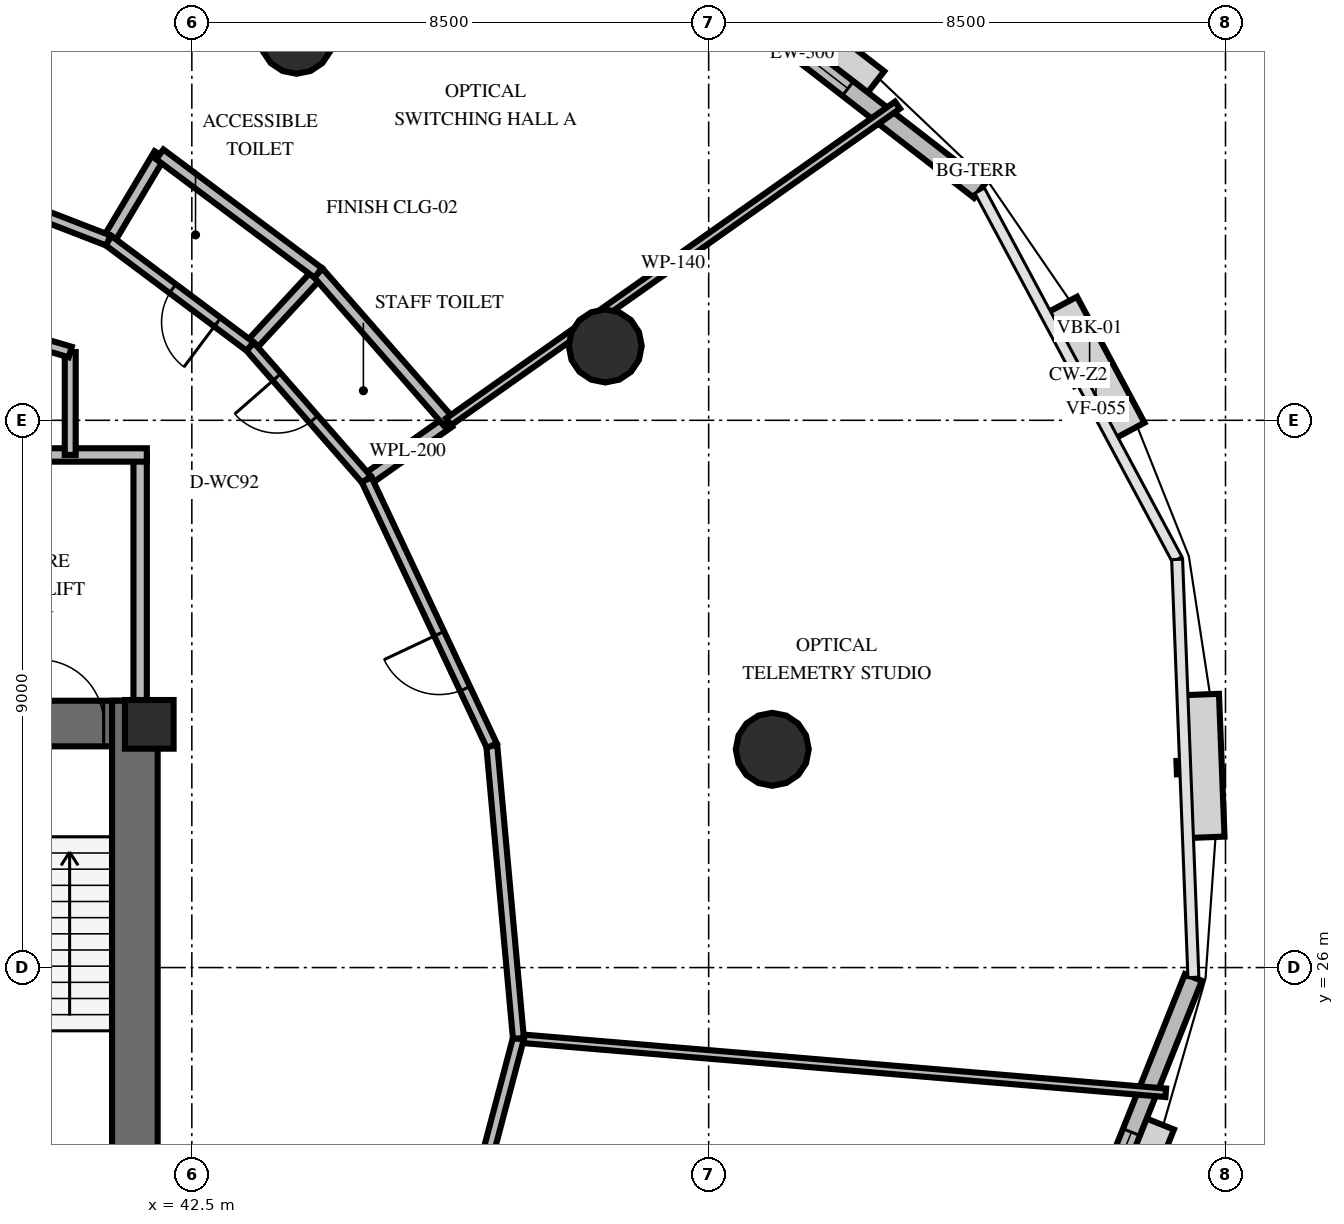
"""IFC4 building model, lengths in metres.
Left out: names, types, materials, properties, quantities, classifications, styles, units other than length and angle.
Written with IfcOpenShell. Run it as: python <this file> out.ifc"""

import sys

from ifc_helpers import new_model, si_unit, direction, frame, frame_2d, origin, origin_2d, place, context, subcontext, project, spatial, rectangle, circle, extrude, element, fill, save


model = new_model("IFC4")
c1 = context("Model", 3, precision=1e-05, world=origin(), true_north=direction((0.0, 1.0)))
c2 = subcontext(c1, "Body", "Model", "MODEL_VIEW")
j1 = project(units=[si_unit("LENGTHUNIT", "METRE"), si_unit("PLANEANGLEUNIT", "RADIAN")], contexts=[c1])
p1 = place(None, origin())
s1 = spatial("IfcSite", under=j1, at=p1, CompositionType="ELEMENT")
p2 = place(p1, origin())
s2 = spatial("IfcBuilding", under=s1, at=p2, CompositionType="ELEMENT")
p3 = place(p2, frame((0.0, 0.0, 97.8)))
s3 = spatial("IfcBuildingStorey", under=s2, at=p3, CompositionType="ELEMENT", Elevation=97.8)
p4 = place(p3, frame((26.072, 30.013, 0.0), z_axis=(0.0, 0.0, 1.0), x_axis=(1.0, 0.0, 0.0)))
e1 = element("IfcWall", 1, at=p4, inside=s3, PredefinedType="SHEAR", context=c2, shape_type="SweptSolid", body=[
    extrude(rectangle(XDim=15.866, YDim=0.75, at=frame_2d((7.933, 0.0))), origin(), (0.0, 0.0, 1.0), 4.0),
])
p5 = place(p4, frame((0.878, 0.0, 0.0)))
e2 = element("IfcOpeningElement", 2, at=p5, cuts=e1, PredefinedType="OPENING", context=c2, shape_type="SweptSolid", body=[
    extrude(rectangle(XDim=1.05, YDim=2.15, at=frame_2d((0.525, 1.075))), frame((0.0, 0.385, 0.0), z_axis=(0.0, -1.0, 0.0), x_axis=(1.0, 0.0, 0.0)), (0.0, 0.0, 1.0), 0.77),
])
p6 = place(p4, frame((13.928, 0.0, 0.0)))
e3 = element("IfcOpeningElement", 3, at=p6, cuts=e1, PredefinedType="OPENING", context=c2, shape_type="SweptSolid", body=[
    extrude(rectangle(XDim=1.05, YDim=2.15, at=frame_2d((0.525, 1.075))), frame((0.0, 0.385, 0.0), z_axis=(0.0, -1.0, 0.0), x_axis=(1.0, 0.0, 0.0)), (0.0, 0.0, 1.0), 0.77),
])
p7 = place(p4, frame((7.378, 0.0, 0.0)))
e4 = element("IfcOpeningElement", 4, at=p7, cuts=e1, PredefinedType="OPENING", context=c2, shape_type="SweptSolid", body=[
    extrude(rectangle(XDim=1.1, YDim=2.15, at=frame_2d((0.55, 1.075))), frame((0.0, 0.385, 0.0), z_axis=(0.0, -1.0, 0.0), x_axis=(1.0, 0.0, 0.0)), (0.0, 0.0, 1.0), 0.77),
])
p8 = place(p3, frame((41.563, 19.812, 0.0), z_axis=(0.0, 0.0, 1.0), x_axis=(0.0, 1.0, 0.0)))
e5 = element("IfcWall", 5, at=p8, inside=s3, PredefinedType="SHEAR", context=c2, shape_type="SweptSolid", body=[
    extrude(rectangle(XDim=10.576, YDim=0.75, at=frame_2d((5.288, 0.0))), origin(), (0.0, 0.0, 1.0), 4.0),
])
p9 = place(p3, frame((41.8, 30.0, 0.0), z_axis=(0.0, 0.0, 1.0), x_axis=(1.0, 0.0, 0.0)))
e6 = element("IfcColumn", 6, at=p9, inside=s3, PredefinedType="PILASTER", context=c2, shape_type="SweptSolid", body=[
    extrude(rectangle(XDim=0.8, YDim=0.8, at=origin_2d()), origin(), (0.0, 0.0, 1.0), 4.0),
])
for number, where, z_axis, x_axis in (
    (7, (52.046, 29.59, 0.0), (0.0, 0.0, 1.0), (1.0, 0.0, 0.0)),
    (8, (49.299, 36.222, 0.0), (0.0, 0.0, 1.0), (1.0, 0.0, 0.0)),
    (9, (44.222, 41.299, 0.0), (0.0, 0.0, 1.0), (1.0, 0.0, 0.0)),
):
    element("IfcColumn", number, at=place(p3, frame(where, z_axis=z_axis, x_axis=x_axis)), inside=s3, PredefinedType="COLUMN", context=c2, shape_type="SweptSolid", body=[
        extrude(circle(Radius=0.6, at=origin_2d()), origin(), (0.0, 0.0, 1.0), 4.0),
    ])
p10 = place(p3, frame((55.457, 38.776, 0.0), z_axis=(0.0, 0.0, 1.0), x_axis=(-0.79036781861, 0.61263260712, 0.0)))
e10 = element("IfcWall", 10, at=p10, inside=s3, PredefinedType="SOLIDWALL", context=c2, shape_type="SweptSolid", body=[
    extrude(rectangle(XDim=7.383, YDim=0.3, at=frame_2d((3.692, 0.0))), origin(), (0.0, 0.0, 1.0), 2.9),
])
p11 = place(p10, frame((2.742, 0.0, 0.8)))
e11 = element("IfcOpeningElement", 11, at=p11, cuts=e10, PredefinedType="OPENING", context=c2, shape_type="SweptSolid", body=[
    extrude(rectangle(XDim=1.9, YDim=1.95, at=frame_2d((0.95, 0.975))), frame((0.0, 0.16, 0.0), z_axis=(0.0, -1.0, 0.0), x_axis=(1.0, 0.0, 0.0)), (0.0, 0.0, 1.0), 0.32),
])
p12 = place(p3, frame((56.228, 18.984, 0.0), z_axis=(0.0, 0.0, 1.0), x_axis=(0.371704219928, 0.928351212035, 0.0)))
e12 = element("IfcWall", 12, at=p12, inside=s3, PredefinedType="SOLIDWALL", context=c2, shape_type="SweptSolid", body=[
    extrude(rectangle(XDim=7.383, YDim=0.3, at=frame_2d((3.692, 0.0))), origin(), (0.0, 0.0, 1.0), 2.9),
])
p13 = place(p12, frame((2.742, 0.0, 0.8)))
e13 = element("IfcOpeningElement", 13, at=p13, cuts=e12, PredefinedType="OPENING", context=c2, shape_type="SweptSolid", body=[
    extrude(rectangle(XDim=1.9, YDim=1.95, at=frame_2d((0.95, 0.975))), frame((0.0, 0.16, 0.0), z_axis=(0.0, -1.0, 0.0), x_axis=(1.0, 0.0, 0.0)), (0.0, 0.0, 1.0), 0.32),
])
p14 = place(p3, frame((41.65, 30.05, 0.0), z_axis=(0.0, 0.0, 1.0), x_axis=(0.0, 1.0, 0.0)))
e14 = element("IfcWall", 14, at=p14, inside=s3, PredefinedType="SOLIDWALL", context=c2, shape_type="SweptSolid", body=[
    extrude(rectangle(XDim=4.38, YDim=0.22, at=frame_2d((2.19, 0.0))), origin(), (0.0, 0.0, 1.0), 2.8),
])
p15 = place(p3, frame((37.45, 34.43, 0.0), z_axis=(0.0, 0.0, 1.0), x_axis=(1.0, 0.0, 0.0)))
e15 = element("IfcWall", 15, at=p15, inside=s3, PredefinedType="SOLIDWALL", context=c2, shape_type="SweptSolid", body=[
    extrude(rectangle(XDim=4.31, YDim=0.22, at=frame_2d((2.155, 0.0))), origin(), (0.0, 0.0, 1.0), 2.8),
])
p16 = place(p15, frame((1.6, 0.0, 0.0)))
e16 = element("IfcOpeningElement", 16, at=p16, cuts=e15, PredefinedType="OPENING", context=c2, shape_type="SweptSolid", body=[
    extrude(rectangle(XDim=1.1, YDim=2.15, at=frame_2d((0.55, 1.075))), frame((0.0, 0.12, 0.0), z_axis=(0.0, -1.0, 0.0), x_axis=(1.0, 0.0, 0.0)), (0.0, 0.0, 1.0), 0.24),
])
p17 = place(p3, frame((40.5, 36.123, 0.0), z_axis=(0.0, 0.0, 1.0), x_axis=(0.0, -1.0, 0.0)))
e17 = element("IfcWall", 17, at=p17, inside=s3, PredefinedType="PARTITIONING", context=c2, shape_type="SweptSolid", body=[
    extrude(rectangle(XDim=1.693, YDim=0.18, at=frame_2d((0.846, 0.0))), origin(), (0.0, 0.0, 1.0), 2.8),
])
p18 = place(p3, frame((34.0, 38.03, 0.0), z_axis=(0.0, 0.0, 1.0), x_axis=(0.959546654541, -0.281549671923, 0.0)))
e18 = element("IfcWall", 18, at=p18, inside=s3, PredefinedType="PARTITIONING", context=c2, shape_type="SweptSolid", body=[
    extrude(rectangle(XDim=6.774, YDim=0.18, at=frame_2d((3.387, 0.0))), origin(), (0.0, 0.0, 1.0), 2.8),
])
p19 = place(p18, frame((2.837, 0.0, 0.0)))
e19 = element("IfcOpeningElement", 19, at=p19, cuts=e18, PredefinedType="OPENING", context=c2, shape_type="SweptSolid", body=[
    extrude(rectangle(XDim=1.1, YDim=2.15, at=frame_2d((0.55, 1.075))), frame((0.0, 0.1, 0.0), z_axis=(0.0, -1.0, 0.0), x_axis=(1.0, 0.0, 0.0)), (0.0, 0.0, 1.0), 0.2),
])
p20 = place(p3, frame((45.375, 34.024, 0.0), z_axis=(0.0, 0.0, 1.0), x_axis=(0.817099068642, 0.576497278419, 0.0)))
e20 = element("IfcWall", 20, at=p20, inside=s3, PredefinedType="PLUMBINGWALL", context=c2, shape_type="SweptSolid", body=[
    extrude(rectangle(XDim=1.65, YDim=0.2, at=frame_2d((0.825, 0.0))), origin(), (0.0, 0.0, 1.0), 2.8),
])
p21 = place(p3, frame((43.458, 36.213, 0.0), z_axis=(0.0, 0.0, 1.0), x_axis=(0.679360827733, 0.733804378388, 0.0)))
e21 = element("IfcWall", 21, at=p21, inside=s3, PredefinedType="PLUMBINGWALL", context=c2, shape_type="SweptSolid", body=[
    extrude(rectangle(XDim=1.65, YDim=0.2, at=frame_2d((0.825, 0.0))), origin(), (0.0, 0.0, 1.0), 2.8),
])
p22 = place(p3, frame((46.723, 34.975, 0.0), z_axis=(0.0, 0.0, 1.0), x_axis=(-0.658674508911, 0.752427997426, 0.0)))
e22 = element("IfcWall", 22, at=p22, inside=s3, PredefinedType="PLUMBINGWALL", context=c2, shape_type="SweptSolid", body=[
    extrude(rectangle(XDim=3.255, YDim=0.2, at=frame_2d((1.627, 0.0))), origin(), (0.0, 0.0, 1.0), 2.8),
])
p23 = place(p3, frame((45.375, 34.024, 0.0), z_axis=(0.0, 0.0, 1.0), x_axis=(-0.658742153317, 0.752368776228, 0.0)))
e23 = element("IfcWall", 23, at=p23, inside=s3, PredefinedType="PARTITIONING", context=c2, shape_type="SweptSolid", body=[
    extrude(rectangle(XDim=2.91, YDim=0.18, at=frame_2d((1.455, 0.0))), origin(), (0.0, 0.0, 1.0), 2.8),
])
p24 = place(p23, frame((1.321, 0.0, 0.0)))
e24 = element("IfcOpeningElement", 24, at=p24, cuts=e23, PredefinedType="OPENING", context=c2, shape_type="SweptSolid", body=[
    extrude(rectangle(XDim=0.92, YDim=2.1, at=frame_2d((0.46, 1.05))), frame((0.0, 0.1, 0.0), z_axis=(0.0, -1.0, 0.0), x_axis=(1.0, 0.0, 0.0)), (0.0, 0.0, 1.0), 0.2),
])
p25 = place(p3, frame((41.128, 37.957, 0.0), z_axis=(0.0, 0.0, 1.0), x_axis=(0.511991057983, 0.858990777916, 0.0)))
e25 = element("IfcWall", 25, at=p25, inside=s3, PredefinedType="PLUMBINGWALL", context=c2, shape_type="SweptSolid", body=[
    extrude(rectangle(XDim=1.65, YDim=0.2, at=frame_2d((0.825, 0.0))), origin(), (0.0, 0.0, 1.0), 2.8),
])
p26 = place(p3, frame((44.579, 37.424, 0.0), z_axis=(0.0, 0.0, 1.0), x_axis=(-0.800755417195, 0.598991453889, 0.0)))
e26 = element("IfcWall", 26, at=p26, inside=s3, PredefinedType="PLUMBINGWALL", context=c2, shape_type="SweptSolid", body=[
    extrude(rectangle(XDim=3.255, YDim=0.2, at=frame_2d((1.627, 0.0))), origin(), (0.0, 0.0, 1.0), 2.8),
])
p27 = place(p3, frame((43.458, 36.213, 0.0), z_axis=(0.0, 0.0, 1.0), x_axis=(-0.800684054085, 0.599086843066, 0.0)))
e27 = element("IfcWall", 27, at=p27, inside=s3, PredefinedType="PARTITIONING", context=c2, shape_type="SweptSolid", body=[
    extrude(rectangle(XDim=2.91, YDim=0.18, at=frame_2d((1.455, 0.0))), origin(), (0.0, 0.0, 1.0), 2.8),
])
p28 = place(p27, frame((0.669, 0.0, 0.0)))
e28 = element("IfcOpeningElement", 28, at=p28, cuts=e27, PredefinedType="OPENING", context=c2, shape_type="SweptSolid", body=[
    extrude(rectangle(XDim=0.92, YDim=2.1, at=frame_2d((0.46, 1.05))), frame((0.0, 0.1, 0.0), z_axis=(0.0, -1.0, 0.0), x_axis=(1.0, 0.0, 0.0)), (0.0, 0.0, 1.0), 0.2),
])
p29 = place(p3, frame((46.723, 34.975, 0.0), z_axis=(0.0, 0.0, 1.0), x_axis=(0.817152059175, 0.576422164898, 0.0)))
e29 = element("IfcWall", 29, at=p29, inside=s3, PredefinedType="PARTITIONING", context=c2, shape_type="SweptSolid", body=[
    extrude(rectangle(XDim=9.034, YDim=0.14, at=frame_2d((4.517, 0.0))), origin(), (0.0, 0.0, 1.0), 2.8),
])
p30 = place(p3, frame((41.128, 37.957, 0.0), z_axis=(0.0, 0.0, 1.0), x_axis=(-0.932324045504, 0.361623940267, 0.0)))
e30 = element("IfcWall", 30, at=p30, inside=s3, PredefinedType="PARTITIONING", context=c2, shape_type="SweptSolid", body=[
    extrude(rectangle(XDim=4.643, YDim=0.18, at=frame_2d((2.321, 0.0))), origin(), (0.0, 0.0, 1.0), 2.8),
])
p31 = place(p30, frame((1.746, 0.0, 0.0)))
e31 = element("IfcOpeningElement", 31, at=p31, cuts=e30, PredefinedType="OPENING", context=c2, shape_type="SweptSolid", body=[
    extrude(rectangle(XDim=1.15, YDim=2.15, at=frame_2d((0.575, 1.075))), frame((0.0, 0.1, 0.0), z_axis=(0.0, -1.0, 0.0), x_axis=(1.0, 0.0, 0.0)), (0.0, 0.0, 1.0), 0.2),
])
p32 = place(p3, frame((47.871, 24.835, 0.0), z_axis=(0.0, 0.0, 1.0), x_axis=(0.996492764064, -0.083678976863, 0.0)))
e32 = element("IfcWall", 32, at=p32, inside=s3, PredefinedType="PARTITIONING", context=c2, shape_type="SweptSolid", body=[
    extrude(rectangle(XDim=10.684, YDim=0.14, at=frame_2d((5.342, 0.0))), origin(), (0.0, 0.0, 1.0), 2.8),
])
p33 = place(p3, frame((46.636, 20.161, 0.0), z_axis=(0.0, 0.0, 1.0), x_axis=(0.255430312845, 0.966827469241, 0.0)))
e33 = element("IfcWall", 33, at=p33, inside=s3, PredefinedType="PARTITIONING", context=c2, shape_type="SweptSolid", body=[
    extrude(rectangle(XDim=4.834, YDim=0.18, at=frame_2d((2.417, 0.0))), origin(), (0.0, 0.0, 1.0), 2.8),
])
p34 = place(p33, frame((1.034, 0.0, 0.0)))
e34 = element("IfcOpeningElement", 34, at=p34, cuts=e33, PredefinedType="OPENING", context=c2, shape_type="SweptSolid", body=[
    extrude(rectangle(XDim=1.0, YDim=2.15, at=frame_2d((0.5, 1.075))), frame((0.0, 0.1, 0.0), z_axis=(0.0, -1.0, 0.0), x_axis=(1.0, 0.0, 0.0)), (0.0, 0.0, 1.0), 0.2),
])
p35 = place(p3, frame((47.871, 24.835, 0.0), z_axis=(0.0, 0.0, 1.0), x_axis=(-0.090599493513, 0.995887409186, 0.0)))
e35 = element("IfcWall", 35, at=p35, inside=s3, PredefinedType="PARTITIONING", context=c2, shape_type="SweptSolid", body=[
    extrude(rectangle(XDim=4.834, YDim=0.18, at=frame_2d((2.417, 0.0))), origin(), (0.0, 0.0, 1.0), 2.8),
])
p36 = place(p3, frame((47.433, 29.65, 0.0), z_axis=(0.0, 0.0, 1.0), x_axis=(-0.425775147607, 0.904829002453, 0.0)))
e36 = element("IfcWall", 36, at=p36, inside=s3, PredefinedType="PARTITIONING", context=c2, shape_type="SweptSolid", body=[
    extrude(rectangle(XDim=4.834, YDim=0.18, at=frame_2d((2.417, 0.0))), origin(), (0.0, 0.0, 1.0), 2.8),
])
p37 = place(p36, frame((1.034, 0.0, 0.0)))
e37 = element("IfcOpeningElement", 37, at=p37, cuts=e36, PredefinedType="OPENING", context=c2, shape_type="SweptSolid", body=[
    extrude(rectangle(XDim=1.0, YDim=2.15, at=frame_2d((0.5, 1.075))), frame((0.0, 0.1, 0.0), z_axis=(0.0, -1.0, 0.0), x_axis=(1.0, 0.0, 0.0)), (0.0, 0.0, 1.0), 0.2),
])
p38 = place(p11, origin())
e38 = element("IfcWindow", 38, at=p38, inside=s3, PartitioningType="SINGLE_PANEL", PredefinedType="WINDOW", context=c2, shape_type="SweptSolid", body=[
    extrude(rectangle(XDim=1.9, YDim=1.95, at=frame_2d((0.95, 0.975))), frame((0.0, 0.03, 0.0), z_axis=(0.0, -1.0, 0.0), x_axis=(1.0, 0.0, 0.0)), (0.0, 0.0, 1.0), 0.06),
])
fill(e11, e38)
p39 = place(p13, origin())
e39 = element("IfcWindow", 39, at=p39, inside=s3, PartitioningType="SINGLE_PANEL", PredefinedType="WINDOW", context=c2, shape_type="SweptSolid", body=[
    extrude(rectangle(XDim=1.9, YDim=1.95, at=frame_2d((0.95, 0.975))), frame((0.0, 0.03, 0.0), z_axis=(0.0, -1.0, 0.0), x_axis=(1.0, 0.0, 0.0)), (0.0, 0.0, 1.0), 0.06),
])
fill(e13, e39)
p40 = place(p6, origin())
e40 = element("IfcDoor", 40, at=p40, inside=s3, OperationType="SINGLE_SWING_LEFT", PredefinedType="DOOR", context=c2, shape_type="SweptSolid", body=[
    extrude(rectangle(XDim=1.05, YDim=2.15, at=frame_2d((0.525, 1.075))), frame((0.0, 0.025, 0.0), z_axis=(0.0, -1.0, 0.0), x_axis=(1.0, 0.0, 0.0)), (0.0, 0.0, 1.0), 0.05),
])
fill(e3, e40)
p41 = place(p24, origin())
e41 = element("IfcDoor", 41, at=p41, inside=s3, OperationType="SINGLE_SWING_RIGHT", PredefinedType="DOOR", context=c2, shape_type="SweptSolid", body=[
    extrude(rectangle(XDim=0.92, YDim=2.1, at=frame_2d((0.46, 1.05))), frame((0.0, 0.025, 0.0), z_axis=(0.0, -1.0, 0.0), x_axis=(1.0, 0.0, 0.0)), (0.0, 0.0, 1.0), 0.05),
])
fill(e24, e41)
p42 = place(p28, origin())
e42 = element("IfcDoor", 42, at=p42, inside=s3, OperationType="SINGLE_SWING_LEFT", PredefinedType="DOOR", context=c2, shape_type="SweptSolid", body=[
    extrude(rectangle(XDim=0.92, YDim=2.1, at=frame_2d((0.46, 1.05))), frame((0.0, 0.025, 0.0), z_axis=(0.0, -1.0, 0.0), x_axis=(1.0, 0.0, 0.0)), (0.0, 0.0, 1.0), 0.05),
])
fill(e28, e42)
p43 = place(p37, origin())
e43 = element("IfcDoor", 43, at=p43, inside=s3, OperationType="SINGLE_SWING_RIGHT", PredefinedType="DOOR", context=c2, shape_type="SweptSolid", body=[
    extrude(rectangle(XDim=1.0, YDim=2.15, at=frame_2d((0.5, 1.075))), frame((0.0, 0.025, 0.0), z_axis=(0.0, -1.0, 0.0), x_axis=(1.0, 0.0, 0.0)), (0.0, 0.0, 1.0), 0.05),
])
fill(e37, e43)
save(model, sys.argv[1])
